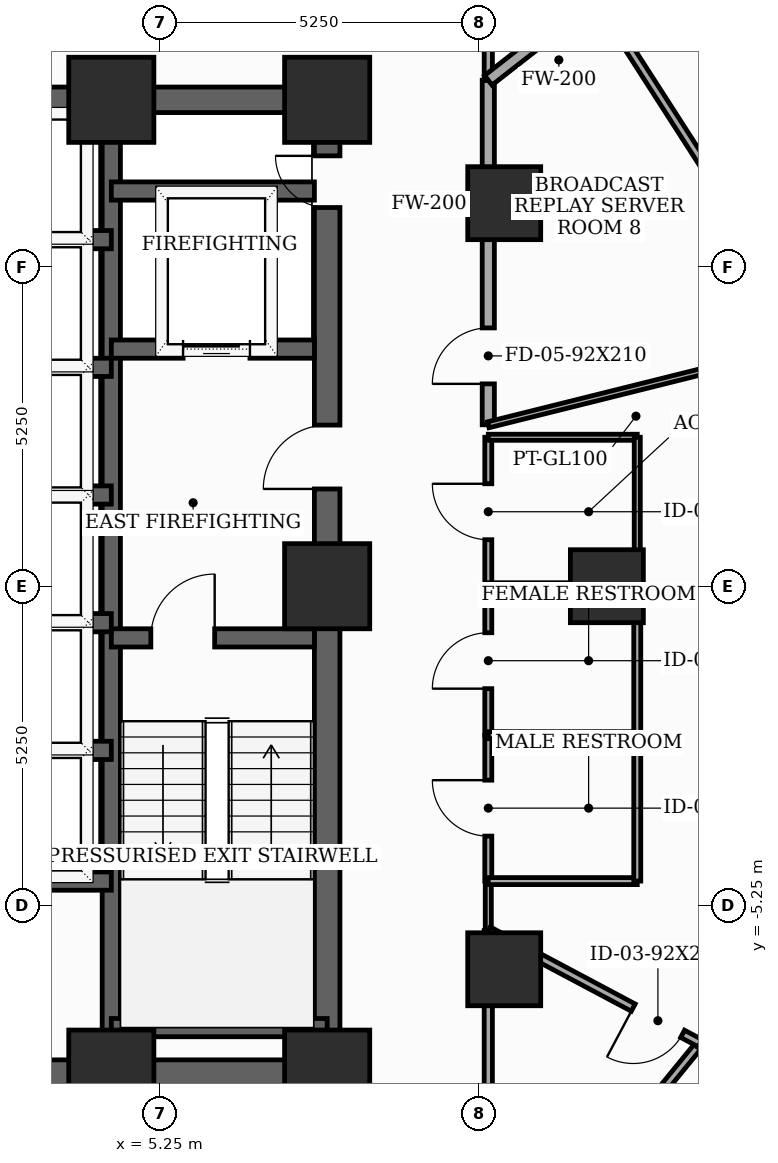
"""IFC4 building model, lengths in metres.
Left out: names, types, materials, properties, quantities, classifications, styles, units other than length and angle.
Written with IfcOpenShell. Run it as: python <this file> out.ifc"""

import sys

from ifc_helpers import new_model, si_unit, direction, frame, frame_2d, origin, origin_2d, place, context, subcontext, project, spatial, rectangle, extrude, element, fill, save


model = new_model("IFC4")
c1 = context("Model", 3, precision=1e-05, world=origin(), true_north=direction((0.0, 1.0)))
c2 = subcontext(c1, "Body", "Model", "MODEL_VIEW")
j1 = project(units=[si_unit("LENGTHUNIT", "METRE"), si_unit("PLANEANGLEUNIT", "RADIAN")], contexts=[c1])
p1 = place(None, origin())
s1 = spatial("IfcSite", under=j1, at=p1, CompositionType="ELEMENT")
p2 = place(p1, origin())
s2 = spatial("IfcBuilding", under=s1, at=p2, CompositionType="ELEMENT")
p3 = place(p2, frame((0.0, 0.0, 119.9)))
s3 = spatial("IfcBuildingStorey", under=s2, at=p3, CompositionType="ELEMENT", Elevation=119.9)
for number, where, z_axis, x_axis in (
    (1, (4.45, -8.0, 0.0), (0.0, 0.0, 1.0), (1.0, 0.0, 0.0)),
    (2, (8.0, -8.0, 0.0), (0.0, 0.0, 1.0), (1.0, 0.0, 0.0)),
    (3, (8.0, 0.0, 0.0), (0.0, 0.0, 1.0), (1.0, 0.0, 0.0)),
    (4, (8.0, 8.0, 0.0), (0.0, 0.0, 1.0), (1.0, 0.0, 0.0)),
    (5, (4.45, 8.0, 0.0), (0.0, 0.0, 1.0), (1.0, 0.0, 0.0)),
):
    element("IfcColumn", number, at=place(p3, frame(where, z_axis=z_axis, x_axis=x_axis)), inside=s3, PredefinedType="COLUMN", context=c2, shape_type="SweptSolid", body=[
        extrude(rectangle(XDim=1.4, YDim=1.4, at=origin_2d()), origin(), (0.0, 0.0, 1.0), 3.7),
    ])
for number, where, z_axis, x_axis in (
    (6, (12.6, 0.0, 0.0), (0.0, 0.0, 1.0), (1.0, 0.0, 0.0)),
    (7, (10.912, 6.3, 0.0), (0.0, 0.0, 1.0), (1.0, 0.0, 0.0)),
    (8, (10.912, -6.3, 0.0), (0.0, 0.0, 1.0), (1.0, 0.0, 0.0)),
):
    element("IfcColumn", number, at=place(p3, frame(where, z_axis=z_axis, x_axis=x_axis)), inside=s3, PredefinedType="COLUMN", context=c2, shape_type="SweptSolid", body=[
        extrude(rectangle(XDim=1.2, YDim=1.2, at=origin_2d()), origin(), (0.0, 0.0, 1.0), 3.7),
    ])
p4 = place(p3, frame((8.0, -8.0, 0.0), z_axis=(0.0, 0.0, 1.0), x_axis=(0.0, 1.0, 0.0)))
e9 = element("IfcWall", 9, at=p4, inside=s3, PredefinedType="SHEAR", context=c2, shape_type="SweptSolid", body=[
    extrude(rectangle(XDim=16.0, YDim=0.42, at=frame_2d((8.0, 0.0))), origin(), (0.0, 0.0, 1.0), 3.5),
])
p5 = place(p4, frame((9.6, 0.0, 0.0)))
e10 = element("IfcOpeningElement", 10, at=p5, cuts=e9, PredefinedType="OPENING", context=c2, shape_type="SweptSolid", body=[
    extrude(rectangle(XDim=1.05, YDim=2.15, at=frame_2d((0.525, 1.075))), frame((0.0, 0.22, 0.0), z_axis=(0.0, -1.0, 0.0), x_axis=(1.0, 0.0, 0.0)), (0.0, 0.0, 1.0), 0.44),
])
p6 = place(p4, frame((14.229, 0.0, 0.0)))
e11 = element("IfcOpeningElement", 11, at=p6, cuts=e9, PredefinedType="OPENING", context=c2, shape_type="SweptSolid", body=[
    extrude(rectangle(XDim=0.85, YDim=2.02, at=frame_2d((0.425, 1.01))), frame((0.0, 0.22, 0.0), z_axis=(0.0, -1.0, 0.0), x_axis=(1.0, 0.0, 0.0)), (0.0, 0.0, 1.0), 0.44),
])
p7 = place(p3, frame((-8.0, -8.0, 0.0), z_axis=(0.0, 0.0, 1.0), x_axis=(1.0, 0.0, 0.0)))
e12 = element("IfcWall", 12, at=p7, inside=s3, PredefinedType="SHEAR", context=c2, shape_type="SweptSolid", body=[
    extrude(rectangle(XDim=16.0, YDim=0.42, at=frame_2d((8.0, 0.0))), origin(), (0.0, 0.0, 1.0), 3.5),
])
p8 = place(p7, frame((7.52, 0.0, 0.0)))
e13 = element("IfcOpeningElement", 13, at=p8, cuts=e12, PredefinedType="OPENING", context=c2, shape_type="SweptSolid", body=[
    extrude(rectangle(XDim=0.95, YDim=2.1, at=frame_2d((0.475, 1.05))), frame((0.0, 0.22, 0.0), z_axis=(0.0, -1.0, 0.0), x_axis=(1.0, 0.0, 0.0)), (0.0, 0.0, 1.0), 0.44),
])
p9 = place(p3, frame((-8.0, 8.0, 0.0), z_axis=(0.0, 0.0, 1.0), x_axis=(1.0, 0.0, 0.0)))
e14 = element("IfcWall", 14, at=p9, inside=s3, PredefinedType="SHEAR", context=c2, shape_type="SweptSolid", body=[
    extrude(rectangle(XDim=16.0, YDim=0.42, at=frame_2d((8.0, 0.0))), origin(), (0.0, 0.0, 1.0), 3.5),
])
p10 = place(p9, frame((7.1, 0.0, 0.0)))
e15 = element("IfcOpeningElement", 15, at=p10, cuts=e14, PredefinedType="OPENING", context=c2, shape_type="SweptSolid", body=[
    extrude(rectangle(XDim=1.8, YDim=2.15, at=frame_2d((0.9, 1.075))), frame((0.0, 0.22, 0.0), z_axis=(0.0, -1.0, 0.0), x_axis=(1.0, 0.0, 0.0)), (0.0, 0.0, 1.0), 0.44),
])
p11 = place(p3, frame((4.45, -7.79, 0.0), z_axis=(0.0, 0.0, 1.0), x_axis=(0.0, 1.0, 0.0)))
e16 = element("IfcWall", 16, at=p11, inside=s3, PredefinedType="SHEAR", context=c2, shape_type="SweptSolid", body=[
    extrude(rectangle(XDim=15.58, YDim=0.3, at=frame_2d((7.79, 0.0))), origin(), (0.0, 0.0, 1.0), 3.5),
])
p12 = place(p3, frame((4.45, -0.85, 0.0), z_axis=(0.0, 0.0, 1.0), x_axis=(1.0, 0.0, 0.0)))
e17 = element("IfcWall", 17, at=p12, inside=s3, PredefinedType="SHEAR", context=c2, shape_type="SweptSolid", body=[
    extrude(rectangle(XDim=3.34, YDim=0.3, at=frame_2d((1.67, 0.0))), origin(), (0.0, 0.0, 1.0), 3.5),
])
p13 = place(p12, frame((0.65, 0.0, 0.0)))
e18 = element("IfcOpeningElement", 18, at=p13, cuts=e17, PredefinedType="OPENING", context=c2, shape_type="SweptSolid", body=[
    extrude(rectangle(XDim=1.05, YDim=2.15, at=frame_2d((0.525, 1.075))), frame((0.0, 0.16, 0.0), z_axis=(0.0, -1.0, 0.0), x_axis=(1.0, 0.0, 0.0)), (0.0, 0.0, 1.0), 0.32),
])
p14 = place(p3, frame((4.45, -7.26, 0.0), z_axis=(0.0, 0.0, 1.0), x_axis=(1.0, 0.0, 0.0)))
e19 = element("IfcWall", 19, at=p14, inside=s3, PredefinedType="SHEAR", context=c2, shape_type="SweptSolid", body=[
    extrude(rectangle(XDim=3.55, YDim=0.3, at=frame_2d((1.775, 0.0))), origin(), (0.0, 0.0, 1.0), 3.5),
])
p15 = place(p3, frame((4.45, 3.9, 0.0), z_axis=(0.0, 0.0, 1.0), x_axis=(1.0, 0.0, 0.0)))
e20 = element("IfcWall", 20, at=p15, inside=s3, PredefinedType="SHEAR", context=c2, shape_type="SweptSolid", body=[
    extrude(rectangle(XDim=3.34, YDim=0.3, at=frame_2d((1.67, 0.0))), origin(), (0.0, 0.0, 1.0), 3.5),
])
p16 = place(p15, frame((1.18, 0.0, 0.0)))
e21 = element("IfcOpeningElement", 21, at=p16, cuts=e20, PredefinedType="OPENING", context=c2, shape_type="SweptSolid", body=[
    extrude(rectangle(XDim=1.1, YDim=2.1, at=frame_2d((0.55, 1.05))), frame((0.0, 0.16, 0.0), z_axis=(0.0, -1.0, 0.0), x_axis=(1.0, 0.0, 0.0)), (0.0, 0.0, 1.0), 0.32),
])
p17 = place(p3, frame((4.45, 6.5, 0.0), z_axis=(0.0, 0.0, 1.0), x_axis=(1.0, 0.0, 0.0)))
e22 = element("IfcWall", 22, at=p17, inside=s3, PredefinedType="SHEAR", context=c2, shape_type="SweptSolid", body=[
    extrude(rectangle(XDim=3.34, YDim=0.3, at=frame_2d((1.67, 0.0))), origin(), (0.0, 0.0, 1.0), 3.5),
])
p18 = place(p3, frame((-4.45, -4.85, 0.0), z_axis=(0.0, 0.0, 1.0), x_axis=(1.0, 0.0, 0.0)))
e23 = element("IfcWall", 23, at=p18, inside=s3, PredefinedType="SHEAR", context=c2, shape_type="SweptSolid", body=[
    extrude(rectangle(XDim=8.9, YDim=0.3, at=frame_2d((4.45, 0.0))), origin(), (0.0, 0.0, 1.0), 3.5),
])
for number, where, z_axis, x_axis in (
    (24, (1.68, 1.5, 0.0), (0.0, 0.0, 1.0), (1.0, 0.0, 0.0)),
    (25, (1.68, 3.6, 0.0), (0.0, 0.0, 1.0), (1.0, 0.0, 0.0)),
    (26, (1.68, 5.7, 0.0), (0.0, 0.0, 1.0), (1.0, 0.0, 0.0)),
    (27, (1.68, -2.7, 0.0), (0.0, 0.0, 1.0), (1.0, 0.0, 0.0)),
    (28, (1.68, -0.6, 0.0), (0.0, 0.0, 1.0), (1.0, 0.0, 0.0)),
):
    element("IfcWall", number, at=place(p3, frame(where, z_axis=z_axis, x_axis=x_axis)), inside=s3, PredefinedType="SHEAR", context=c2, shape_type="SweptSolid", body=[
        extrude(rectangle(XDim=2.77, YDim=0.3, at=frame_2d((1.385, 0.0))), origin(), (0.0, 0.0, 1.0), 3.5),
    ])
p19 = place(p3, frame((10.65, -10.15, 0.0), z_axis=(0.0, 0.0, 1.0), x_axis=(0.0, 1.0, 0.0)))
e29 = element("IfcWall", 29, at=p19, inside=s3, PredefinedType="PARTITIONING", context=c2, shape_type="SweptSolid", body=[
    extrude(rectangle(XDim=4.487, YDim=0.135, at=frame_2d((2.243, 0.0))), origin(), (0.0, 0.0, 1.0), 2.785),
])
p20 = place(p19, frame((0.781, 0.0, 0.0)))
e30 = element("IfcOpeningElement", 30, at=p20, cuts=e29, PredefinedType="OPENING", context=c2, shape_type="SweptSolid", body=[
    extrude(rectangle(XDim=0.95, YDim=2.1, at=frame_2d((0.475, 1.05))), frame((0.0, 0.077, 0.0), z_axis=(0.0, -1.0, 0.0), x_axis=(1.0, 0.0, 0.0)), (0.0, 0.0, 1.0), 0.155),
])
p21 = place(p3, frame((10.65, -4.85, 0.0), z_axis=(0.0, 0.0, 1.0), x_axis=(0.0, 1.0, 0.0)))
e31 = element("IfcWall", 31, at=p21, inside=s3, PredefinedType="PARTITIONING", context=c2, shape_type="SweptSolid", body=[
    extrude(rectangle(XDim=2.4, YDim=0.115, at=frame_2d((1.2, 0.0))), origin(), (0.0, 0.0, 1.0), 3.5),
])
p22 = place(p21, frame((0.74, 0.0, 0.0)))
e32 = element("IfcOpeningElement", 32, at=p22, cuts=e31, PredefinedType="OPENING", context=c2, shape_type="SweptSolid", body=[
    extrude(rectangle(XDim=0.92, YDim=2.1, at=frame_2d((0.46, 1.05))), frame((0.0, 0.067, 0.0), z_axis=(0.0, -1.0, 0.0), x_axis=(1.0, 0.0, 0.0)), (0.0, 0.0, 1.0), 0.135),
])
p23 = place(p3, frame((10.65, -2.45, 0.0), z_axis=(0.0, 0.0, 1.0), x_axis=(0.0, 1.0, 0.0)))
e33 = element("IfcWall", 33, at=p23, inside=s3, PredefinedType="PARTITIONING", context=c2, shape_type="SweptSolid", body=[
    extrude(rectangle(XDim=2.45, YDim=0.115, at=frame_2d((1.225, 0.0))), origin(), (0.0, 0.0, 1.0), 2.785),
])
p24 = place(p23, frame((0.765, 0.0, 0.0)))
e34 = element("IfcOpeningElement", 34, at=p24, cuts=e33, PredefinedType="OPENING", context=c2, shape_type="SweptSolid", body=[
    extrude(rectangle(XDim=0.92, YDim=2.1, at=frame_2d((0.46, 1.05))), frame((0.0, 0.067, 0.0), z_axis=(0.0, -1.0, 0.0), x_axis=(1.0, 0.0, 0.0)), (0.0, 0.0, 1.0), 0.135),
])
p25 = place(p3, frame((10.65, -5.663, 0.0), z_axis=(0.0, 0.0, 1.0), x_axis=(0.0, 1.0, 0.0)))
e35 = element("IfcWall", 35, at=p25, inside=s3, PredefinedType="MOVABLE", context=c2, shape_type="SweptSolid", body=[
    extrude(rectangle(XDim=0.813, YDim=0.1, at=frame_2d((0.406, 0.0))), origin(), (0.0, 0.0, 1.0), 3.5),
])
p26 = place(p3, frame((10.65, 0.0, 0.0), z_axis=(0.0, 0.0, 1.0), x_axis=(0.0, 1.0, 0.0)))
e36 = element("IfcWall", 36, at=p26, inside=s3, PredefinedType="PARTITIONING", context=c2, shape_type="SweptSolid", body=[
    extrude(rectangle(XDim=2.45, YDim=0.115, at=frame_2d((1.225, 0.0))), origin(), (0.0, 0.0, 1.0), 2.785),
])
p27 = place(p26, frame((0.765, 0.0, 0.0)))
e37 = element("IfcOpeningElement", 37, at=p27, cuts=e36, PredefinedType="OPENING", context=c2, shape_type="SweptSolid", body=[
    extrude(rectangle(XDim=0.92, YDim=2.1, at=frame_2d((0.46, 1.05))), frame((0.0, 0.067, 0.0), z_axis=(0.0, -1.0, 0.0), x_axis=(1.0, 0.0, 0.0)), (0.0, 0.0, 1.0), 0.135),
])
p28 = place(p3, frame((10.65, 2.655, 0.0), z_axis=(0.0, 0.0, 1.0), x_axis=(0.0, 1.0, 0.0)))
e38 = element("IfcWall", 38, at=p28, inside=s3, PredefinedType="SOLIDWALL", context=c2, shape_type="SweptSolid", body=[
    extrude(rectangle(XDim=5.666, YDim=0.2, at=frame_2d((2.833, 0.0))), origin(), (0.0, 0.0, 1.0), 2.785),
])
p29 = place(p28, frame((0.673, 0.0, 0.0)))
e39 = element("IfcOpeningElement", 39, at=p29, cuts=e38, PredefinedType="OPENING", context=c2, shape_type="SweptSolid", body=[
    extrude(rectangle(XDim=0.92, YDim=2.1, at=frame_2d((0.46, 1.05))), frame((0.0, 0.11, 0.0), z_axis=(0.0, -1.0, 0.0), x_axis=(1.0, 0.0, 0.0)), (0.0, 0.0, 1.0), 0.22),
])
p30 = place(p3, frame((10.65, 8.321, 0.0), z_axis=(0.0, 0.0, 1.0), x_axis=(0.0, 1.0, 0.0)))
e40 = element("IfcWall", 40, at=p30, inside=s3, PredefinedType="PARTITIONING", context=c2, shape_type="SweptSolid", body=[
    extrude(rectangle(XDim=1.829, YDim=0.135, at=frame_2d((0.915, 0.0))), origin(), (0.0, 0.0, 1.0), 3.125),
])
p31 = place(p3, frame((9.912, -12.687, 0.0), z_axis=(0.0, 0.0, 1.0), x_axis=(0.632781686385, 0.774330250846, 0.0)))
e41 = element("IfcWall", 41, at=p31, inside=s3, PredefinedType="PARTITIONING", context=c2, shape_type="SweptSolid", body=[
    extrude(rectangle(XDim=6.677, YDim=0.135, at=frame_2d((3.338, 0.0))), origin(), (0.0, 0.0, 1.0), 2.885),
])
p32 = place(p3, frame((14.137, -7.517, 0.0), z_axis=(0.0, 0.0, 1.0), x_axis=(-0.882957991608, 0.46945200506, 0.0)))
e42 = element("IfcWall", 42, at=p32, inside=s3, PredefinedType="PARTITIONING", context=c2, shape_type="SweptSolid", body=[
    extrude(rectangle(XDim=3.949, YDim=0.135, at=frame_2d((1.975, 0.0))), origin(), (0.0, 0.0, 1.0), 2.785),
])
p33 = place(p32, frame((0.33, 0.0, 0.0)))
e43 = element("IfcOpeningElement", 43, at=p33, cuts=e42, PredefinedType="OPENING", context=c2, shape_type="SweptSolid", body=[
    extrude(rectangle(XDim=0.92, YDim=2.1, at=frame_2d((0.46, 1.05))), frame((0.0, 0.077, 0.0), z_axis=(0.0, -1.0, 0.0), x_axis=(1.0, 0.0, 0.0)), (0.0, 0.0, 1.0), 0.155),
])
p34 = place(p3, frame((19.07, -10.14, 0.0), z_axis=(0.0, 0.0, 1.0), x_axis=(-0.882959500857, 0.469449166413, 0.0)))
e44 = element("IfcWall", 44, at=p34, inside=s3, PredefinedType="PARTITIONING", context=c2, shape_type="SweptSolid", body=[
    extrude(rectangle(XDim=5.586, YDim=0.16, at=frame_2d((2.793, 0.0))), origin(), (0.0, 0.0, 1.0), 2.985),
])
for number, where, z_axis, x_axis in (
    (45, (13.1, -2.45, 0.0), (0.0, 0.0, 1.0), (-1.0, 0.0, 0.0)),
    (46, (10.65, -4.85, 0.0), (0.0, 0.0, 1.0), (1.0, 0.0, 0.0)),
):
    element("IfcWall", number, at=place(p3, frame(where, z_axis=z_axis, x_axis=x_axis)), inside=s3, PredefinedType="PARTITIONING", context=c2, shape_type="SweptSolid", body=[
        extrude(rectangle(XDim=2.45, YDim=0.115, at=frame_2d((1.225, 0.0))), origin(), (0.0, 0.0, 1.0), 2.785),
    ])
p35 = place(p3, frame((13.1, -4.85, 0.0), z_axis=(0.0, 0.0, 1.0), x_axis=(0.0, 1.0, 0.0)))
e47 = element("IfcWall", 47, at=p35, inside=s3, PredefinedType="PARTITIONING", context=c2, shape_type="SweptSolid", body=[
    extrude(rectangle(XDim=2.4, YDim=0.115, at=frame_2d((1.2, 0.0))), origin(), (0.0, 0.0, 1.0), 3.5),
])
p36 = place(p3, frame((13.1, -2.45, 0.0), z_axis=(0.0, 0.0, 1.0), x_axis=(0.0, 1.0, 0.0)))
e48 = element("IfcWall", 48, at=p36, inside=s3, PredefinedType="PARTITIONING", context=c2, shape_type="SweptSolid", body=[
    extrude(rectangle(XDim=2.45, YDim=0.115, at=frame_2d((1.225, 0.0))), origin(), (0.0, 0.0, 1.0), 3.5),
])
p37 = place(p3, frame((13.1, 0.0, 0.0), z_axis=(0.0, 0.0, 1.0), x_axis=(-1.0, 0.0, 0.0)))
e49 = element("IfcWall", 49, at=p37, inside=s3, PredefinedType="PARTITIONING", context=c2, shape_type="SweptSolid", body=[
    extrude(rectangle(XDim=2.45, YDim=0.115, at=frame_2d((1.225, 0.0))), origin(), (0.0, 0.0, 1.0), 2.785),
])
p38 = place(p3, frame((10.65, 2.45, 0.0), z_axis=(0.0, 0.0, 1.0), x_axis=(1.0, 0.0, 0.0)))
e50 = element("IfcWall", 50, at=p38, inside=s3, PredefinedType="MOVABLE", context=c2, shape_type="SweptSolid", body=[
    extrude(rectangle(XDim=2.45, YDim=0.1, at=frame_2d((1.225, 0.0))), origin(), (0.0, 0.0, 1.0), 2.785),
])
p39 = place(p3, frame((13.1, 2.45, 0.0), z_axis=(0.0, 0.0, 1.0), x_axis=(0.0, -1.0, 0.0)))
e51 = element("IfcWall", 51, at=p39, inside=s3, PredefinedType="MOVABLE", context=c2, shape_type="SweptSolid", body=[
    extrude(rectangle(XDim=2.45, YDim=0.1, at=frame_2d((1.225, 0.0))), origin(), (0.0, 0.0, 1.0), 3.5),
])
p40 = place(p3, frame((15.289, 3.812, 0.0), z_axis=(0.0, 0.0, 1.0), x_axis=(-0.970280510542, -0.241982914402, 0.0)))
e52 = element("IfcWall", 52, at=p40, inside=s3, PredefinedType="MOVABLE", context=c2, shape_type="SweptSolid", body=[
    extrude(rectangle(XDim=4.781, YDim=0.1, at=frame_2d((2.391, 0.0))), origin(), (0.0, 0.0, 1.0), 2.785),
])
p41 = place(p3, frame((12.416, 9.701, 0.0), z_axis=(0.0, 0.0, 1.0), x_axis=(0.540981963117, -0.841034194062, 0.0)))
e53 = element("IfcWall", 53, at=p41, inside=s3, PredefinedType="PARTITIONING", context=c2, shape_type="SweptSolid", body=[
    extrude(rectangle(XDim=3.299, YDim=0.135, at=frame_2d((1.65, 0.0))), origin(), (0.0, 0.0, 1.0), 2.885),
])
p42 = place(p3, frame((12.416, 9.701, 0.0), z_axis=(0.0, 0.0, 1.0), x_axis=(-0.788001252745, -0.615673635681, 0.0)))
e54 = element("IfcWall", 54, at=p42, inside=s3, PredefinedType="SOLIDWALL", context=c2, shape_type="SweptSolid", body=[
    extrude(rectangle(XDim=2.241, YDim=0.2, at=frame_2d((1.121, 0.0))), origin(), (0.0, 0.0, 1.0), 2.885),
])
p43 = place(p5, origin())
e55 = element("IfcDoor", 55, at=p43, inside=s3, OperationType="SINGLE_SWING_LEFT", PredefinedType="DOOR", context=c2, shape_type="SweptSolid", body=[
    extrude(rectangle(XDim=1.05, YDim=2.15, at=frame_2d((0.525, 1.075))), frame((0.0, 0.025, 0.0), z_axis=(0.0, -1.0, 0.0), x_axis=(1.0, 0.0, 0.0)), (0.0, 0.0, 1.0), 0.05),
])
fill(e10, e55)
p44 = place(p6, origin())
e56 = element("IfcDoor", 56, at=p44, inside=s3, OperationType="SINGLE_SWING_RIGHT", PredefinedType="TRAPDOOR", context=c2, shape_type="SweptSolid", body=[
    extrude(rectangle(XDim=0.85, YDim=2.02, at=frame_2d((0.425, 1.01))), frame((0.0, 0.025, 0.0), z_axis=(0.0, -1.0, 0.0), x_axis=(1.0, 0.0, 0.0)), (0.0, 0.0, 1.0), 0.05),
])
fill(e11, e56)
p45 = place(p13, origin())
e57 = element("IfcDoor", 57, at=p45, inside=s3, OperationType="SINGLE_SWING_RIGHT", PredefinedType="DOOR", context=c2, shape_type="SweptSolid", body=[
    extrude(rectangle(XDim=1.05, YDim=2.15, at=frame_2d((0.525, 1.075))), frame((0.0, 0.025, 0.0), z_axis=(0.0, -1.0, 0.0), x_axis=(1.0, 0.0, 0.0)), (0.0, 0.0, 1.0), 0.05),
])
fill(e18, e57)
p46 = place(p16, origin())
e58 = element("IfcDoor", 58, at=p46, inside=s3, OperationType="SLIDING_TO_LEFT", PredefinedType="DOOR", context=c2, shape_type="SweptSolid", body=[
    extrude(rectangle(XDim=1.1, YDim=2.1, at=frame_2d((0.55, 1.05))), frame((0.0, 0.025, 0.0), z_axis=(0.0, -1.0, 0.0), x_axis=(1.0, 0.0, 0.0)), (0.0, 0.0, 1.0), 0.05),
])
fill(e21, e58)
p47 = place(p22, origin())
e59 = element("IfcDoor", 59, at=p47, inside=s3, OperationType="SINGLE_SWING_RIGHT", PredefinedType="DOOR", context=c2, shape_type="SweptSolid", body=[
    extrude(rectangle(XDim=0.92, YDim=2.1, at=frame_2d((0.46, 1.05))), frame((0.0, 0.025, 0.0), z_axis=(0.0, -1.0, 0.0), x_axis=(1.0, 0.0, 0.0)), (0.0, 0.0, 1.0), 0.05),
])
fill(e32, e59)
p48 = place(p24, origin())
e60 = element("IfcDoor", 60, at=p48, inside=s3, OperationType="SINGLE_SWING_LEFT", PredefinedType="DOOR", context=c2, shape_type="SweptSolid", body=[
    extrude(rectangle(XDim=0.92, YDim=2.1, at=frame_2d((0.46, 1.05))), frame((0.0, 0.025, 0.0), z_axis=(0.0, -1.0, 0.0), x_axis=(1.0, 0.0, 0.0)), (0.0, 0.0, 1.0), 0.05),
])
fill(e34, e60)
p49 = place(p27, origin())
e61 = element("IfcDoor", 61, at=p49, inside=s3, OperationType="SINGLE_SWING_RIGHT", PredefinedType="DOOR", context=c2, shape_type="SweptSolid", body=[
    extrude(rectangle(XDim=0.92, YDim=2.1, at=frame_2d((0.46, 1.05))), frame((0.0, 0.025, 0.0), z_axis=(0.0, -1.0, 0.0), x_axis=(1.0, 0.0, 0.0)), (0.0, 0.0, 1.0), 0.05),
])
fill(e37, e61)
p50 = place(p29, origin())
e62 = element("IfcDoor", 62, at=p50, inside=s3, OperationType="SINGLE_SWING_LEFT", PredefinedType="DOOR", context=c2, shape_type="SweptSolid", body=[
    extrude(rectangle(XDim=0.92, YDim=2.1, at=frame_2d((0.46, 1.05))), frame((0.0, 0.025, 0.0), z_axis=(0.0, -1.0, 0.0), x_axis=(1.0, 0.0, 0.0)), (0.0, 0.0, 1.0), 0.05),
])
fill(e39, e62)
p51 = place(p33, origin())
e63 = element("IfcDoor", 63, at=p51, inside=s3, OperationType="SINGLE_SWING_RIGHT", PredefinedType="DOOR", context=c2, shape_type="SweptSolid", body=[
    extrude(rectangle(XDim=0.92, YDim=2.1, at=frame_2d((0.46, 1.05))), frame((0.0, 0.025, 0.0), z_axis=(0.0, -1.0, 0.0), x_axis=(1.0, 0.0, 0.0)), (0.0, 0.0, 1.0), 0.05),
])
fill(e43, e63)
save(model, sys.argv[1])
